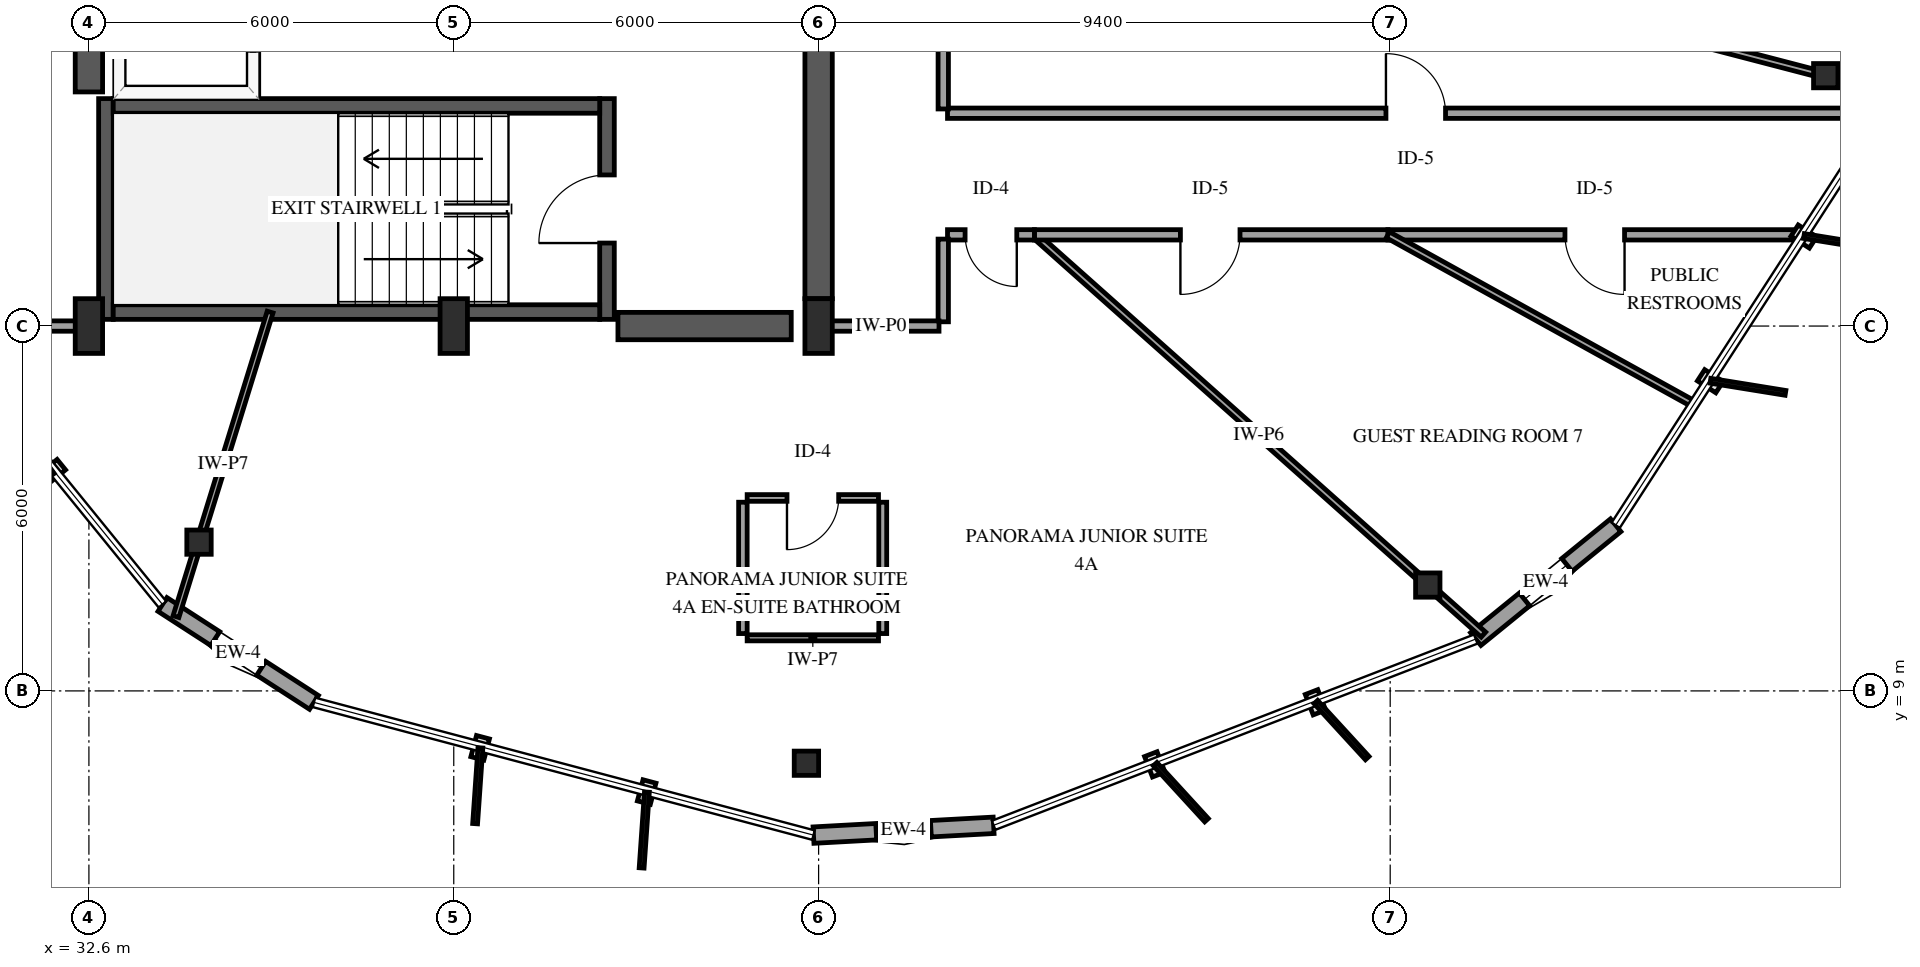
"""IFC4 building model, lengths in metres.
Left out: names, types, materials, properties, quantities, classifications, styles, units other than length and angle.
Written with IfcOpenShell. Run it as: python <this file> out.ifc"""

import sys

from ifc_helpers import new_model, si_unit, direction, frame, frame_2d, origin, origin_2d, place, context, subcontext, project, spatial, rectangle, i_section, extrude, element, fill, save


model = new_model("IFC4")
c1 = context("Model", 3, precision=1e-05, world=origin(), true_north=direction((0.0, 1.0)))
c2 = subcontext(c1, "Body", "Model", "MODEL_VIEW")
j1 = project(units=[si_unit("LENGTHUNIT", "METRE"), si_unit("PLANEANGLEUNIT", "RADIAN")], contexts=[c1])
p1 = place(None, origin())
s1 = spatial("IfcSite", under=j1, at=p1, CompositionType="ELEMENT")
p2 = place(p1, origin())
s2 = spatial("IfcBuilding", under=s1, at=p2, CompositionType="ELEMENT")
p3 = place(p2, frame((0.0, 0.0, 242.5)))
s3 = spatial("IfcBuildingStorey", under=s2, at=p3, CompositionType="ELEMENT", Elevation=242.5)
p4 = place(p3, frame((32.88, 15.11, 0.0), z_axis=(0.0, 0.0, 1.0), x_axis=(0.0, 1.0, 0.0)))
e1 = element("IfcWall", 1, at=p4, inside=s3, PredefinedType="SHEAR", context=c2, shape_type="SweptSolid", body=[
    extrude(rectangle(XDim=3.63, YDim=0.24, at=frame_2d((1.815, 0.0))), origin(), (0.0, 0.0, 1.0), 3.75),
])
p5 = place(p3, frame((41.12, 15.11, 0.0), z_axis=(0.0, 0.0, 1.0), x_axis=(0.0, 1.0, 0.0)))
e2 = element("IfcWall", 2, at=p5, inside=s3, PredefinedType="SHEAR", context=c2, shape_type="SweptSolid", body=[
    extrude(rectangle(XDim=3.63, YDim=0.24, at=frame_2d((1.815, 0.0))), origin(), (0.0, 0.0, 1.0), 3.75),
])
p6 = place(p5, frame((1.255, 0.0, 0.0)))
e3 = element("IfcOpeningElement", 3, at=p6, cuts=e2, PredefinedType="OPENING", context=c2, shape_type="SweptSolid", body=[
    extrude(rectangle(XDim=1.12, YDim=2.15, at=frame_2d((0.56, 1.075))), frame((0.0, 0.13, 0.0), z_axis=(0.0, -1.0, 0.0), x_axis=(1.0, 0.0, 0.0)), (0.0, 0.0, 1.0), 0.26),
])
for number, where, z_axis, x_axis in (
    (4, (33.0, 15.23, 0.0), (0.0, 0.0, 1.0), (1.0, 0.0, 0.0)),
    (5, (33.0, 18.62, 0.0), (0.0, 0.0, 1.0), (1.0, 0.0, 0.0)),
):
    element("IfcWall", number, at=place(p3, frame(where, z_axis=z_axis, x_axis=x_axis)), inside=s3, PredefinedType="SHEAR", context=c2, shape_type="SweptSolid", body=[
        extrude(rectangle(XDim=8.0, YDim=0.24, at=frame_2d((4.0, 0.0))), origin(), (0.0, 0.0, 1.0), 3.75),
    ])
p7 = place(p3, frame((32.6, 18.85, 0.0), z_axis=(0.0, 0.0, 1.0), x_axis=(0.0, 1.0, 0.0)))
e6 = element("IfcWall", 6, at=p7, inside=s3, PredefinedType="SHEAR", context=c2, shape_type="SweptSolid", body=[
    extrude(rectangle(XDim=12.3, YDim=0.45, at=frame_2d((6.15, 0.0))), origin(), (0.0, 0.0, 1.0), 3.75),
])
p8 = place(p3, frame((41.3, 15.0, 0.0), z_axis=(0.0, 0.0, 1.0), x_axis=(1.0, 0.0, 0.0)))
e7 = element("IfcWall", 7, at=p8, inside=s3, PredefinedType="SHEAR", context=c2, shape_type="SweptSolid", body=[
    extrude(rectangle(XDim=2.85, YDim=0.45, at=frame_2d((1.425, 0.0))), origin(), (0.0, 0.0, 1.0), 3.75),
])
p9 = place(p3, frame((44.6, 15.45, 0.0), z_axis=(0.0, 0.0, 1.0), x_axis=(0.0, 1.0, 0.0)))
e8 = element("IfcWall", 8, at=p9, inside=s3, PredefinedType="SHEAR", context=c2, shape_type="SweptSolid", body=[
    extrude(rectangle(XDim=6.35, YDim=0.45, at=frame_2d((3.175, 0.0))), origin(), (0.0, 0.0, 1.0), 3.75),
])
for number, where, z_axis, x_axis in (
    (9, (32.6, 15.0, -0.3), (0.0, 0.0, 1.0), (1.0, 0.0, 0.0)),
    (10, (38.6, 15.0, -0.3), (0.0, 0.0, 1.0), (1.0, 0.0, 0.0)),
    (11, (44.6, 15.0, -0.3), (0.0, 0.0, 1.0), (1.0, 0.0, 0.0)),
):
    element("IfcColumn", number, at=place(p3, frame(where, z_axis=z_axis, x_axis=x_axis)), inside=s3, PredefinedType="PILASTER", context=c2, shape_type="SweptSolid", body=[
        extrude(rectangle(XDim=0.45, YDim=0.9, at=origin_2d()), origin(), (0.0, 0.0, 1.0), 4.05),
    ])
for number, where, z_axis, x_axis in (
    (12, (34.411, 11.446, -0.3), (0.0, 0.0, 1.0), (1.0, 0.0, 0.0)),
    (13, (44.4, 7.811, -0.3), (0.0, 0.0, 1.0), (1.0, 0.0, 0.0)),
    (14, (54.618, 10.74, -0.3), (0.0, 0.0, 1.0), (1.0, 0.0, 0.0)),
    (15, (61.163, 19.117, -0.3), (0.0, 0.0, 1.0), (1.0, 0.0, 0.0)),
):
    element("IfcColumn", number, at=place(p3, frame(where, z_axis=z_axis, x_axis=x_axis)), inside=s3, PredefinedType="COLUMN", context=c2, shape_type="SweptSolid", body=[
        extrude(i_section(OverallWidth=0.401, OverallDepth=0.399, WebThickness=0.025, FlangeThickness=0.04, FilletRadius=0.038, at=origin_2d()), origin(), (0.0, 0.0, 1.0), 4.05),
    ])
p10 = place(p3, frame((33.81, 10.422, 0.0), z_axis=(0.0, 0.0, 1.0), x_axis=(0.839779856866, -0.54292705956, 0.0)))
e16 = element("IfcWall", 16, at=p10, inside=s3, PredefinedType="SOLIDWALL", context=c2, shape_type="SweptSolid", body=[
    extrude(rectangle(XDim=2.967, YDim=0.27, at=frame_2d((1.483, 0.0))), origin(), (0.0, 0.0, 1.0), 2.829),
])
p11 = place(p10, frame((1.033, 0.0, 0.75)))
e17 = element("IfcOpeningElement", 17, at=p11, cuts=e16, PredefinedType="OPENING", context=c2, shape_type="SweptSolid", body=[
    extrude(rectangle(XDim=0.9, YDim=1.5, at=frame_2d((0.45, 0.75))), frame((0.0, 0.145, 0.0), z_axis=(0.0, -1.0, 0.0), x_axis=(1.0, 0.0, 0.0)), (0.0, 0.0, 1.0), 0.29),
])
p12 = place(p3, frame((44.516, 6.628, 0.0), z_axis=(0.0, 0.0, 1.0), x_axis=(0.998519286297, 0.054398850098, 0.0)))
e18 = element("IfcWall", 18, at=p12, inside=s3, PredefinedType="SOLIDWALL", context=c2, shape_type="SweptSolid", body=[
    extrude(rectangle(XDim=2.967, YDim=0.27, at=frame_2d((1.483, 0.0))), origin(), (0.0, 0.0, 1.0), 2.829),
])
p13 = place(p12, frame((1.033, 0.0, 0.75)))
e19 = element("IfcOpeningElement", 19, at=p13, cuts=e18, PredefinedType="OPENING", context=c2, shape_type="SweptSolid", body=[
    extrude(rectangle(XDim=0.9, YDim=1.5, at=frame_2d((0.45, 0.75))), frame((0.0, 0.145, 0.0), z_axis=(0.0, -1.0, 0.0), x_axis=(1.0, 0.0, 0.0)), (0.0, 0.0, 1.0), 0.29),
])
p14 = place(p3, frame((55.407, 9.853, 0.0), z_axis=(0.0, 0.0, 1.0), x_axis=(0.77584960114, 0.630917899898, 0.0)))
e20 = element("IfcWall", 20, at=p14, inside=s3, PredefinedType="SOLIDWALL", context=c2, shape_type="SweptSolid", body=[
    extrude(rectangle(XDim=2.967, YDim=0.27, at=frame_2d((1.483, 0.0))), origin(), (0.0, 0.0, 1.0), 2.829),
])
p15 = place(p14, frame((1.033, 0.0, 0.75)))
e21 = element("IfcOpeningElement", 21, at=p15, cuts=e20, PredefinedType="OPENING", context=c2, shape_type="SweptSolid", body=[
    extrude(rectangle(XDim=0.9, YDim=1.5, at=frame_2d((0.45, 0.75))), frame((0.0, 0.145, 0.0), z_axis=(0.0, -1.0, 0.0), x_axis=(1.0, 0.0, 0.0)), (0.0, 0.0, 1.0), 0.29),
])
p16 = place(p3, frame((35.3, 18.79, 0.0), z_axis=(0.0, 0.0, 1.0), x_axis=(0.0, 1.0, 0.0)))
e22 = element("IfcWall", 22, at=p16, inside=s3, PredefinedType="SOLIDWALL", context=c2, shape_type="SweptSolid", body=[
    extrude(rectangle(XDim=2.55, YDim=0.185, at=frame_2d((1.275, 0.0))), origin(), (0.0, 0.0, 1.0), 3.45),
])
p17 = place(p16, frame((0.725, 0.0, 0.0)))
e23 = element("IfcOpeningElement", 23, at=p17, cuts=e22, PredefinedType="OPENING", context=c2, shape_type="SweptSolid", body=[
    extrude(rectangle(XDim=1.1, YDim=2.15, at=frame_2d((0.55, 1.075))), frame((0.0, 0.103, 0.0), z_axis=(0.0, -1.0, 0.0), x_axis=(1.0, 0.0, 0.0)), (0.0, 0.0, 1.0), 0.205),
])
p18 = place(p3, frame((46.65, 22.901, 0.0), z_axis=(0.0, 0.0, 1.0), x_axis=(0.967662952178, -0.252246726405, 0.0)))
e24 = element("IfcWall", 24, at=p18, inside=s3, PredefinedType="PARTITIONING", context=c2, shape_type="SweptSolid", body=[
    extrude(rectangle(XDim=16.17, YDim=0.11, at=frame_2d((8.085, 0.0))), origin(), (0.0, 0.0, 1.0), 3.45),
])
p19 = place(p3, frame((46.72, 18.5, 0.0), z_axis=(0.0, 0.0, 1.0), x_axis=(1.0, 0.0, 0.0)))
e25 = element("IfcWall", 25, at=p19, inside=s3, PredefinedType="PARTITIONING", context=c2, shape_type="SweptSolid", body=[
    extrude(rectangle(XDim=15.369, YDim=0.17, at=frame_2d((7.685, 0.0))), origin(), (0.0, 0.0, 1.0), 2.745),
])
p20 = place(p19, frame((7.21, 0.0, 0.0)))
e26 = element("IfcOpeningElement", 26, at=p20, cuts=e25, PredefinedType="OPENING", context=c2, shape_type="SweptSolid", body=[
    extrude(rectangle(XDim=0.98, YDim=2.15, at=frame_2d((0.49, 1.075))), frame((0.0, 0.095, 0.0), z_axis=(0.0, -1.0, 0.0), x_axis=(1.0, 0.0, 0.0)), (0.0, 0.0, 1.0), 0.19),
])
p21 = place(p3, frame((48.149, 16.5, 0.0), z_axis=(0.0, 0.0, 1.0), x_axis=(0.746887266328, -0.664950683432, 0.0)))
e27 = element("IfcWall", 27, at=p21, inside=s3, PredefinedType="PARTITIONING", context=c2, shape_type="SweptSolid", body=[
    extrude(rectangle(XDim=9.886, YDim=0.11, at=frame_2d((4.943, 0.0))), origin(), (0.0, 0.0, 1.0), 2.828),
])
p22 = place(p3, frame((60.796, 16.5, 0.0), z_axis=(0.0, 0.0, 1.0), x_axis=(-1.0, 0.0, 0.0)))
e28 = element("IfcWall", 28, at=p22, inside=s3, PredefinedType="PARTITIONING", context=c2, shape_type="SweptSolid", body=[
    extrude(rectangle(XDim=6.834, YDim=0.17, at=frame_2d((3.417, 0.0))), origin(), (0.0, 0.0, 1.0), 3.45),
])
p23 = place(p22, frame((2.942, 0.0, 0.0)))
e29 = element("IfcOpeningElement", 29, at=p23, cuts=e28, PredefinedType="OPENING", context=c2, shape_type="SweptSolid", body=[
    extrude(rectangle(XDim=0.98, YDim=2.15, at=frame_2d((0.49, 1.075))), frame((0.0, 0.095, 0.0), z_axis=(0.0, -1.0, 0.0), x_axis=(1.0, 0.0, 0.0)), (0.0, 0.0, 1.0), 0.19),
])
p24 = place(p3, frame((53.962, 16.5, 0.0), z_axis=(0.0, 0.0, 1.0), x_axis=(-1.0, 0.0, 0.0)))
e30 = element("IfcWall", 30, at=p24, inside=s3, PredefinedType="PARTITIONING", context=c2, shape_type="SweptSolid", body=[
    extrude(rectangle(XDim=5.813, YDim=0.17, at=frame_2d((2.906, 0.0))), origin(), (0.0, 0.0, 1.0), 3.45),
])
p25 = place(p24, frame((2.432, 0.0, 0.0)))
e31 = element("IfcOpeningElement", 31, at=p25, cuts=e30, PredefinedType="OPENING", context=c2, shape_type="SweptSolid", body=[
    extrude(rectangle(XDim=0.98, YDim=2.15, at=frame_2d((0.49, 1.075))), frame((0.0, 0.095, 0.0), z_axis=(0.0, -1.0, 0.0), x_axis=(1.0, 0.0, 0.0)), (0.0, 0.0, 1.0), 0.19),
])
p26 = place(p3, frame((53.962, 16.5, 0.0), z_axis=(0.0, 0.0, 1.0), x_axis=(0.874990816909, -0.484139515351, 0.0)))
e32 = element("IfcWall", 32, at=p26, inside=s3, PredefinedType="PARTITIONING", context=c2, shape_type="SweptSolid", body=[
    extrude(rectangle(XDim=5.752, YDim=0.11, at=frame_2d((2.876, 0.0))), origin(), (0.0, 0.0, 1.0), 3.45),
])
p27 = place(p3, frame((35.58, 15.23, 0.0), z_axis=(0.0, 0.0, 1.0), x_axis=(-0.295332551785, -0.955394517389, 0.0)))
e33 = element("IfcWall", 33, at=p27, inside=s3, PredefinedType="PARTITIONING", context=c2, shape_type="SweptSolid", body=[
    extrude(rectangle(XDim=5.242, YDim=0.1, at=frame_2d((2.621, 0.0))), origin(), (0.0, 0.0, 1.0), 2.745),
])
p28 = place(p3, frame((46.65, 22.901, 0.0), z_axis=(0.0, 0.0, 1.0), x_axis=(0.0, -1.0, 0.0)))
e34 = element("IfcWall", 34, at=p28, inside=s3, PredefinedType="PARTITIONING", context=c2, shape_type="SweptSolid", body=[
    extrude(rectangle(XDim=4.331, YDim=0.17, at=frame_2d((2.166, 0.0))), origin(), (0.0, 0.0, 1.0), 3.45),
])
p29 = place(p3, frame((32.53, 15.0, 0.0), z_axis=(0.0, 0.0, 1.0), x_axis=(-1.0, 0.0, 0.0)))
e35 = element("IfcWall", 35, at=p29, inside=s3, PredefinedType="PARTITIONING", context=c2, shape_type="SweptSolid", body=[
    extrude(rectangle(XDim=2.444, YDim=0.17, at=frame_2d((1.222, 0.0))), origin(), (0.0, 0.0, 1.0), 3.45),
])
p30 = place(p29, frame((0.747, 0.0, 0.0)))
e36 = element("IfcOpeningElement", 36, at=p30, cuts=e35, PredefinedType="OPENING", context=c2, shape_type="SweptSolid", body=[
    extrude(rectangle(XDim=0.98, YDim=2.15, at=frame_2d((0.49, 1.075))), frame((0.0, 0.095, 0.0), z_axis=(0.0, -1.0, 0.0), x_axis=(1.0, 0.0, 0.0)), (0.0, 0.0, 1.0), 0.19),
])
p31 = place(p3, frame((45.585, 12.173, 0.0), z_axis=(0.0, 0.0, 1.0), x_axis=(-1.0, 0.0, 0.0)))
e37 = element("IfcWall", 37, at=p31, inside=s3, PredefinedType="PARTITIONING", context=c2, shape_type="SweptSolid", body=[
    extrude(rectangle(XDim=2.16, YDim=0.11, at=frame_2d((1.08, 0.0))), origin(), (0.0, 0.0, 1.0), 3.45),
])
p32 = place(p31, frame((0.655, 0.0, 0.0)))
e38 = element("IfcOpeningElement", 38, at=p32, cuts=e37, PredefinedType="OPENING", context=c2, shape_type="SweptSolid", body=[
    extrude(rectangle(XDim=0.85, YDim=2.1, at=frame_2d((0.425, 1.05))), frame((0.0, 0.065, 0.0), z_axis=(0.0, -1.0, 0.0), x_axis=(1.0, 0.0, 0.0)), (0.0, 0.0, 1.0), 0.13),
])
p33 = place(p3, frame((43.425, 9.873, 0.0), z_axis=(0.0, 0.0, 1.0), x_axis=(1.0, 0.0, 0.0)))
e39 = element("IfcWall", 39, at=p33, inside=s3, PredefinedType="PARTITIONING", context=c2, shape_type="SweptSolid", body=[
    extrude(rectangle(XDim=2.16, YDim=0.1, at=frame_2d((1.08, 0.0))), origin(), (0.0, 0.0, 1.0), 3.45),
])
p34 = place(p3, frame((43.355, 12.103, 0.0), z_axis=(0.0, 0.0, 1.0), x_axis=(0.0, -1.0, 0.0)))
e40 = element("IfcWall", 40, at=p34, inside=s3, PredefinedType="PARTITIONING", context=c2, shape_type="SweptSolid", body=[
    extrude(rectangle(XDim=2.16, YDim=0.14, at=frame_2d((1.08, 0.0))), origin(), (0.0, 0.0, 1.0), 3.45),
])
p35 = place(p3, frame((45.655, 9.943, 0.0), z_axis=(0.0, 0.0, 1.0), x_axis=(0.0, 1.0, 0.0)))
e41 = element("IfcWall", 41, at=p35, inside=s3, PredefinedType="PARTITIONING", context=c2, shape_type="SweptSolid", body=[
    extrude(rectangle(XDim=2.16, YDim=0.13, at=frame_2d((1.08, 0.0))), origin(), (0.0, 0.0, 1.0), 3.45),
])
p36 = place(p3, frame((48.149, 16.5, 0.0), z_axis=(0.0, 0.0, 1.0), x_axis=(-1.0, 0.0, 0.0)))
e42 = element("IfcWall", 42, at=p36, inside=s3, PredefinedType="PARTITIONING", context=c2, shape_type="SweptSolid", body=[
    extrude(rectangle(XDim=1.429, YDim=0.17, at=frame_2d((0.714, 0.0))), origin(), (0.0, 0.0, 1.0), 3.45),
])
p37 = place(p36, frame((0.29, 0.0, 0.0)))
e43 = element("IfcOpeningElement", 43, at=p37, cuts=e42, PredefinedType="OPENING", context=c2, shape_type="SweptSolid", body=[
    extrude(rectangle(XDim=0.85, YDim=2.1, at=frame_2d((0.425, 1.05))), frame((0.0, 0.095, 0.0), z_axis=(0.0, -1.0, 0.0), x_axis=(1.0, 0.0, 0.0)), (0.0, 0.0, 1.0), 0.19),
])
p38 = place(p3, frame((46.65, 16.43, 0.0), z_axis=(0.0, 0.0, 1.0), x_axis=(0.0, -1.0, 0.0)))
e44 = element("IfcWall", 44, at=p38, inside=s3, PredefinedType="PARTITIONING", context=c2, shape_type="SweptSolid", body=[
    extrude(rectangle(XDim=1.36, YDim=0.17, at=frame_2d((0.68, 0.0))), origin(), (0.0, 0.0, 1.0), 3.45),
])
p39 = place(p3, frame((46.58, 15.0, 0.0), z_axis=(0.0, 0.0, 1.0), x_axis=(-1.0, 0.0, 0.0)))
e45 = element("IfcWall", 45, at=p39, inside=s3, PredefinedType="PARTITIONING", context=c2, shape_type="SweptSolid", body=[
    extrude(rectangle(XDim=1.139, YDim=0.17, at=frame_2d((0.57, 0.0))), origin(), (0.0, 0.0, 1.0), 3.45),
])
p40 = place(p3, frame((45.439, 15.0, 0.0), z_axis=(0.0, 0.0, 1.0), x_axis=(-1.0, 0.0, 0.0)))
e46 = element("IfcWall", 46, at=p40, inside=s3, PredefinedType="PARTITIONING", context=c2, shape_type="SweptSolid", body=[
    extrude(rectangle(XDim=0.769, YDim=0.17, at=frame_2d((0.385, 0.0))), origin(), (0.0, 0.0, 1.0), 3.45),
])
p41 = place(p11, origin())
e47 = element("IfcWindow", 47, at=p41, inside=s3, PartitioningType="SINGLE_PANEL", PredefinedType="WINDOW", context=c2, shape_type="SweptSolid", body=[
    extrude(rectangle(XDim=0.9, YDim=1.5, at=frame_2d((0.45, 0.75))), frame((0.0, 0.03, 0.0), z_axis=(0.0, -1.0, 0.0), x_axis=(1.0, 0.0, 0.0)), (0.0, 0.0, 1.0), 0.06),
])
fill(e17, e47)
p42 = place(p13, origin())
e48 = element("IfcWindow", 48, at=p42, inside=s3, PartitioningType="SINGLE_PANEL", PredefinedType="WINDOW", context=c2, shape_type="SweptSolid", body=[
    extrude(rectangle(XDim=0.9, YDim=1.5, at=frame_2d((0.45, 0.75))), frame((0.0, 0.03, 0.0), z_axis=(0.0, -1.0, 0.0), x_axis=(1.0, 0.0, 0.0)), (0.0, 0.0, 1.0), 0.06),
])
fill(e19, e48)
p43 = place(p15, origin())
e49 = element("IfcWindow", 49, at=p43, inside=s3, PartitioningType="SINGLE_PANEL", PredefinedType="WINDOW", context=c2, shape_type="SweptSolid", body=[
    extrude(rectangle(XDim=0.9, YDim=1.5, at=frame_2d((0.45, 0.75))), frame((0.0, 0.03, 0.0), z_axis=(0.0, -1.0, 0.0), x_axis=(1.0, 0.0, 0.0)), (0.0, 0.0, 1.0), 0.06),
])
fill(e21, e49)
p44 = place(p6, origin())
e50 = element("IfcDoor", 50, at=p44, inside=s3, OperationType="SINGLE_SWING_LEFT", PredefinedType="DOOR", context=c2, shape_type="SweptSolid", body=[
    extrude(rectangle(XDim=1.12, YDim=2.15, at=frame_2d((0.56, 1.075))), frame((0.0, 0.025, 0.0), z_axis=(0.0, -1.0, 0.0), x_axis=(1.0, 0.0, 0.0)), (0.0, 0.0, 1.0), 0.05),
])
fill(e3, e50)
p45 = place(p20, origin())
e51 = element("IfcDoor", 51, at=p45, inside=s3, OperationType="SINGLE_SWING_LEFT", PredefinedType="DOOR", context=c2, shape_type="SweptSolid", body=[
    extrude(rectangle(XDim=0.98, YDim=2.15, at=frame_2d((0.49, 1.075))), frame((0.0, 0.025, 0.0), z_axis=(0.0, -1.0, 0.0), x_axis=(1.0, 0.0, 0.0)), (0.0, 0.0, 1.0), 0.05),
])
fill(e26, e51)
p46 = place(p23, origin())
e52 = element("IfcDoor", 52, at=p46, inside=s3, OperationType="SINGLE_SWING_LEFT", PredefinedType="DOOR", context=c2, shape_type="SweptSolid", body=[
    extrude(rectangle(XDim=0.98, YDim=2.15, at=frame_2d((0.49, 1.075))), frame((0.0, 0.025, 0.0), z_axis=(0.0, -1.0, 0.0), x_axis=(1.0, 0.0, 0.0)), (0.0, 0.0, 1.0), 0.05),
])
fill(e29, e52)
p47 = place(p25, origin())
e53 = element("IfcDoor", 53, at=p47, inside=s3, OperationType="SINGLE_SWING_RIGHT", PredefinedType="DOOR", context=c2, shape_type="SweptSolid", body=[
    extrude(rectangle(XDim=0.98, YDim=2.15, at=frame_2d((0.49, 1.075))), frame((0.0, 0.025, 0.0), z_axis=(0.0, -1.0, 0.0), x_axis=(1.0, 0.0, 0.0)), (0.0, 0.0, 1.0), 0.05),
])
fill(e31, e53)
p48 = place(p32, origin())
e54 = element("IfcDoor", 54, at=p48, inside=s3, OperationType="SINGLE_SWING_RIGHT", PredefinedType="DOOR", context=c2, shape_type="SweptSolid", body=[
    extrude(rectangle(XDim=0.85, YDim=2.1, at=frame_2d((0.425, 1.05))), frame((0.0, 0.025, 0.0), z_axis=(0.0, -1.0, 0.0), x_axis=(1.0, 0.0, 0.0)), (0.0, 0.0, 1.0), 0.05),
])
fill(e38, e54)
p49 = place(p37, origin())
e55 = element("IfcDoor", 55, at=p49, inside=s3, OperationType="SINGLE_SWING_LEFT", PredefinedType="DOOR", context=c2, shape_type="SweptSolid", body=[
    extrude(rectangle(XDim=0.85, YDim=2.1, at=frame_2d((0.425, 1.05))), frame((0.0, 0.025, 0.0), z_axis=(0.0, -1.0, 0.0), x_axis=(1.0, 0.0, 0.0)), (0.0, 0.0, 1.0), 0.05),
])
fill(e43, e55)
save(model, sys.argv[1])
